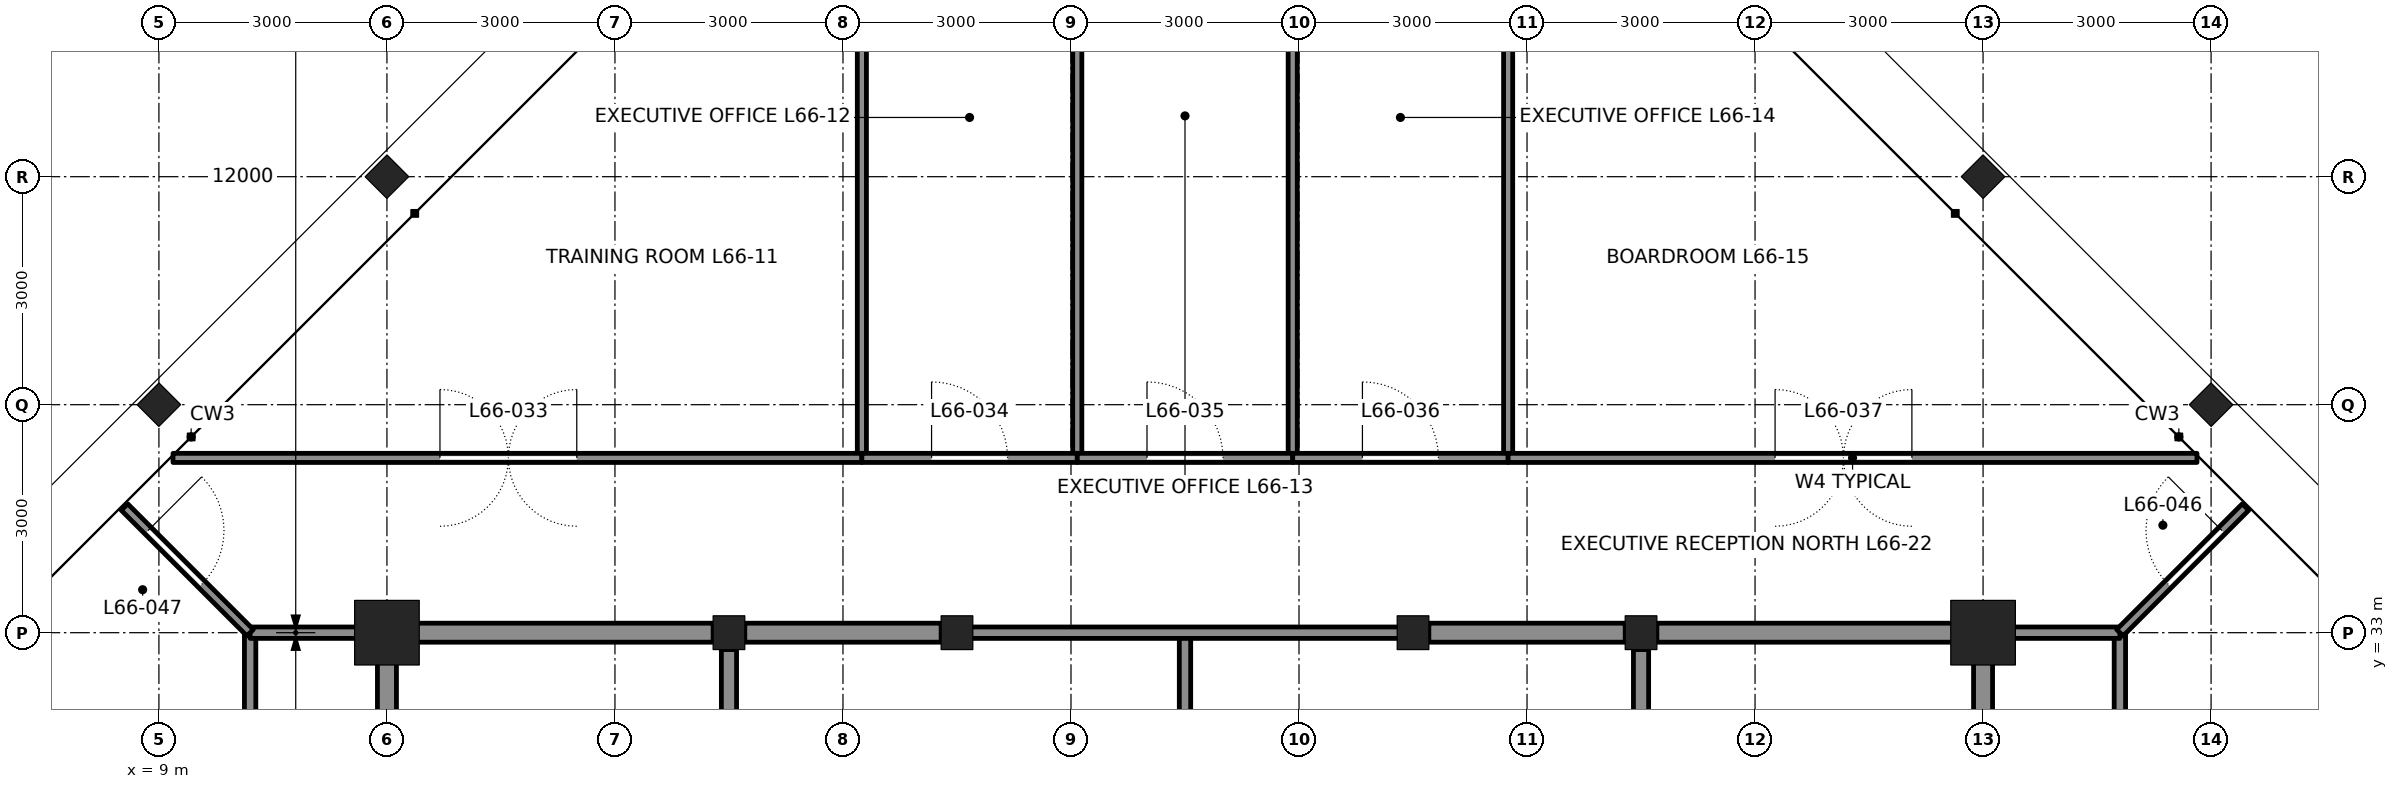
"""IFC4 building model, lengths in metres.
Left out: names, types, materials, properties, quantities, classifications, styles, units other than length and angle.
Written with IfcOpenShell. Run it as: python <this file> out.ifc"""

import sys

from ifc_helpers import new_model, si_unit, direction, frame, frame_2d, origin, origin_2d, place, context, subcontext, project, spatial, rectangle, hollow_rectangle, i_section, extrude, element, fill, save


model = new_model("IFC4")
c1 = context("Model", 3, precision=1e-05, world=origin(), true_north=direction((0.0, 1.0)))
c2 = subcontext(c1, "Body", "Model", "MODEL_VIEW")
j1 = project(units=[si_unit("LENGTHUNIT", "METRE"), si_unit("PLANEANGLEUNIT", "RADIAN")], contexts=[c1])
p1 = place(None, origin())
s1 = spatial("IfcSite", under=j1, at=p1, CompositionType="ELEMENT")
p2 = place(p1, origin())
s2 = spatial("IfcBuilding", under=s1, at=p2, CompositionType="ELEMENT")
p3 = place(p2, frame((0.0, 0.0, 295.8)))
s3 = spatial("IfcBuildingStorey", under=s2, at=p3, CompositionType="ELEMENT", Elevation=295.8)
for number, where, z_axis, x_axis in (
    (1, (36.0, 36.0, 0.0), (0.0, 0.0, 1.0), (0.707, 0.707, 0.0)),
    (2, (33.0, 39.0, 0.0), (0.0, 0.0, 1.0), (0.707, 0.707, 0.0)),
    (3, (12.0, 39.0, 0.0), (0.0, 0.0, 1.0), (-0.707, 0.707, 0.0)),
    (4, (9.0, 36.0, 0.0), (0.0, 0.0, 1.0), (-0.707, 0.707, 0.0)),
):
    element("IfcColumn", number, at=place(p3, frame(where, z_axis=z_axis, x_axis=x_axis)), inside=s3, PredefinedType="COLUMN", context=c2, shape_type="SweptSolid", body=[
        extrude(i_section(OverallWidth=0.404, OverallDepth=0.406, WebThickness=0.027, FlangeThickness=0.044, at=origin_2d()), origin(), (0.0, 0.0, 1.0), 4.2),
    ])
p4 = place(p3, frame((12.0, 33.0, 0.0), z_axis=(0.0, 0.0, 1.0), x_axis=(1.0, 0.0, 0.0)))
e5 = element("IfcColumn", 5, at=p4, inside=s3, PredefinedType="COLUMN", context=c2, shape_type="SweptSolid", body=[
    extrude(hollow_rectangle(XDim=0.85, YDim=0.85, WallThickness=0.085, at=origin_2d()), origin(), (0.0, 0.0, 1.0), 4.2),
])
for number, where, z_axis, x_axis in (
    (6, (16.5, 33.0, 0.0), (0.0, 0.0, 1.0), (1.0, 0.0, 0.0)),
    (7, (19.5, 33.0, 0.0), (0.0, 0.0, 1.0), (1.0, 0.0, 0.0)),
    (8, (25.5, 33.0, 0.0), (0.0, 0.0, 1.0), (1.0, 0.0, 0.0)),
    (9, (28.5, 33.0, 0.0), (0.0, 0.0, 1.0), (1.0, 0.0, 0.0)),
):
    element("IfcColumn", number, at=place(p3, frame(where, z_axis=z_axis, x_axis=x_axis)), inside=s3, PredefinedType="COLUMN", context=c2, shape_type="SweptSolid", body=[
        extrude(i_section(OverallWidth=0.417, OverallDepth=0.445, WebThickness=0.039, FlangeThickness=0.063, at=origin_2d()), origin(), (0.0, 0.0, 1.0), 4.2),
    ])
p5 = place(p3, frame((33.0, 33.0, 0.0), z_axis=(0.0, 0.0, 1.0), x_axis=(1.0, 0.0, 0.0)))
e10 = element("IfcColumn", 10, at=p5, inside=s3, PredefinedType="COLUMN", context=c2, shape_type="SweptSolid", body=[
    extrude(hollow_rectangle(XDim=0.85, YDim=0.85, WallThickness=0.085, at=origin_2d()), origin(), (0.0, 0.0, 1.0), 4.2),
])
p6 = place(p3, frame((12.0, 24.222, 0.0), z_axis=(0.0, 0.0, 1.0), x_axis=(0.0, 1.0, 0.0)))
e11 = element("IfcWall", 11, at=p6, inside=s3, PredefinedType="SOLIDWALL", context=c2, shape_type="SweptSolid", body=[
    extrude(rectangle(XDim=8.528, YDim=0.25, at=frame_2d((4.264, 0.0))), origin(), (0.0, 0.0, 1.0), 3.113),
])
p7 = place(p6, frame((0.678, 0.0, 0.0)))
e12 = element("IfcOpeningElement", 12, at=p7, cuts=e11, PredefinedType="OPENING", context=c2, shape_type="SweptSolid", body=[
    extrude(rectangle(XDim=1.2, YDim=2.1, at=frame_2d((0.6, 1.05))), frame((0.0, 0.135, 0.0), z_axis=(0.0, -1.0, 0.0), x_axis=(1.0, 0.0, 0.0)), (0.0, 0.0, 1.0), 0.27),
])
p8 = place(p6, frame((6.903, 0.0, 0.0)))
e13 = element("IfcOpeningElement", 13, at=p8, cuts=e11, PredefinedType="OPENING", context=c2, shape_type="SweptSolid", body=[
    extrude(rectangle(XDim=0.75, YDim=2.1, at=frame_2d((0.375, 1.05))), frame((0.0, 0.135, 0.0), z_axis=(0.0, -1.0, 0.0), x_axis=(1.0, 0.0, 0.0)), (0.0, 0.0, 1.0), 0.27),
])
p9 = place(p3, frame((12.25, 33.0, 0.0), z_axis=(0.0, 0.0, 1.0), x_axis=(1.0, 0.0, 0.0)))
e14 = element("IfcWall", 14, at=p9, inside=s3, PredefinedType="SOLIDWALL", context=c2, shape_type="SweptSolid", body=[
    extrude(rectangle(XDim=4.042, YDim=0.25, at=frame_2d((2.021, 0.0))), origin(), (0.0, 0.0, 1.0), 3.181),
])
for number, where, z_axis, x_axis in (
    (15, (16.708, 33.0, 0.0), (0.0, 0.0, 1.0), (1.0, 0.0, 0.0)),
    (16, (25.708, 33.0, 0.0), (0.0, 0.0, 1.0), (1.0, 0.0, 0.0)),
):
    element("IfcWall", number, at=place(p3, frame(where, z_axis=z_axis, x_axis=x_axis)), inside=s3, PredefinedType="SOLIDWALL", context=c2, shape_type="SweptSolid", body=[
        extrude(rectangle(XDim=2.583, YDim=0.25, at=frame_2d((1.292, 0.0))), origin(), (0.0, 0.0, 1.0), 3.181),
    ])
p10 = place(p3, frame((28.708, 33.0, 0.0), z_axis=(0.0, 0.0, 1.0), x_axis=(1.0, 0.0, 0.0)))
e17 = element("IfcWall", 17, at=p10, inside=s3, PredefinedType="SOLIDWALL", context=c2, shape_type="SweptSolid", body=[
    extrude(rectangle(XDim=4.042, YDim=0.25, at=frame_2d((2.021, 0.0))), origin(), (0.0, 0.0, 1.0), 3.181),
])
for number, where, z_axis, x_axis in (
    (18, (16.5, 24.222, 0.0), (0.0, 0.0, 1.0), (0.0, 1.0, 0.0)),
    (19, (28.5, 24.222, 0.0), (0.0, 0.0, 1.0), (0.0, 1.0, 0.0)),
):
    element("IfcWall", number, at=place(p3, frame(where, z_axis=z_axis, x_axis=x_axis)), inside=s3, PredefinedType="SOLIDWALL", context=c2, shape_type="SweptSolid", body=[
        extrude(rectangle(XDim=8.555, YDim=0.2, at=frame_2d((4.278, 0.0))), origin(), (0.0, 0.0, 1.0), 3.113),
    ])
p11 = place(p3, frame((33.0, 24.222, 0.0), z_axis=(0.0, 0.0, 1.0), x_axis=(0.0, 1.0, 0.0)))
e20 = element("IfcWall", 20, at=p11, inside=s3, PredefinedType="SOLIDWALL", context=c2, shape_type="SweptSolid", body=[
    extrude(rectangle(XDim=8.528, YDim=0.25, at=frame_2d((4.264, 0.0))), origin(), (0.0, 0.0, 1.0), 3.113),
])
p12 = place(p11, frame((6.903, 0.0, 0.0)))
e21 = element("IfcOpeningElement", 21, at=p12, cuts=e20, PredefinedType="OPENING", context=c2, shape_type="SweptSolid", body=[
    extrude(rectangle(XDim=0.75, YDim=2.1, at=frame_2d((0.375, 1.05))), frame((0.0, 0.135, 0.0), z_axis=(0.0, -1.0, 0.0), x_axis=(1.0, 0.0, 0.0)), (0.0, 0.0, 1.0), 0.27),
])
p13 = place(p3, frame((22.5, 27.0, 0.0), z_axis=(0.0, 0.0, 1.0), x_axis=(0.0, 1.0, 0.0)))
e22 = element("IfcWall", 22, at=p13, inside=s3, PredefinedType="PARTITIONING", context=c2, shape_type="SweptSolid", body=[
    extrude(rectangle(XDim=6.0, YDim=0.15, at=frame_2d((3.0, 0.0))), origin(), (0.0, 0.0, 1.0), 4.04),
])
p14 = place(p3, frame((19.5, 33.0, 0.0), z_axis=(0.0, 0.0, 1.0), x_axis=(1.0, 0.0, 0.0)))
e23 = element("IfcWall", 23, at=p14, inside=s3, PredefinedType="PARTITIONING", context=c2, shape_type="SweptSolid", body=[
    extrude(rectangle(XDim=6.0, YDim=0.15, at=frame_2d((3.0, 0.0))), origin(), (0.0, 0.0, 1.0), 3.181),
])
p15 = place(p3, frame((18.249, 44.334, 0.0), z_axis=(0.0, 0.0, 1.0), x_axis=(0.0, -1.0, 0.0)))
e24 = element("IfcWall", 24, at=p15, inside=s3, PredefinedType="PARTITIONING", context=c2, shape_type="SweptSolid", body=[
    extrude(rectangle(XDim=9.034, YDim=0.12, at=frame_2d((4.517, 0.0))), origin(), (0.0, 0.0, 1.0), 4.04),
])
for number, where, z_axis, x_axis in (
    (25, (21.083, 44.347, 0.0), (0.0, 0.0, 1.0), (0.0, -1.0, 0.0)),
    (26, (23.917, 44.347, 0.0), (0.0, 0.0, 1.0), (0.0, -1.0, 0.0)),
):
    element("IfcWall", number, at=place(p3, frame(where, z_axis=z_axis, x_axis=x_axis)), inside=s3, PredefinedType="PARTITIONING", context=c2, shape_type="SweptSolid", body=[
        extrude(rectangle(XDim=9.047, YDim=0.12, at=frame_2d((4.524, 0.0))), origin(), (0.0, 0.0, 1.0), 3.278),
    ])
p16 = place(p3, frame((26.751, 44.334, 0.0), z_axis=(0.0, 0.0, 1.0), x_axis=(0.0, -1.0, 0.0)))
e27 = element("IfcWall", 27, at=p16, inside=s3, PredefinedType="PARTITIONING", context=c2, shape_type="SweptSolid", body=[
    extrude(rectangle(XDim=9.034, YDim=0.12, at=frame_2d((4.517, 0.0))), origin(), (0.0, 0.0, 1.0), 4.04),
])
p17 = place(p3, frame((9.186, 35.3, 0.0), z_axis=(0.0, 0.0, 1.0), x_axis=(1.0, 0.0, 0.0)))
e28 = element("IfcWall", 28, at=p17, inside=s3, PredefinedType="PARTITIONING", context=c2, shape_type="SweptSolid", body=[
    extrude(rectangle(XDim=9.063, YDim=0.12, at=frame_2d((4.531, 0.0))), origin(), (0.0, 0.0, 1.0), 4.04),
])
p18 = place(p17, frame((3.512, 0.0, 0.0)))
e29 = element("IfcOpeningElement", 29, at=p18, cuts=e28, PredefinedType="OPENING", context=c2, shape_type="SweptSolid", body=[
    extrude(rectangle(XDim=1.8, YDim=2.4, at=frame_2d((0.9, 1.2))), frame((0.0, 0.07, 0.0), z_axis=(0.0, -1.0, 0.0), x_axis=(1.0, 0.0, 0.0)), (0.0, 0.0, 1.0), 0.14),
])
p19 = place(p3, frame((18.249, 35.3, 0.0), z_axis=(0.0, 0.0, 1.0), x_axis=(1.0, 0.0, 0.0)))
e30 = element("IfcWall", 30, at=p19, inside=s3, PredefinedType="PARTITIONING", context=c2, shape_type="SweptSolid", body=[
    extrude(rectangle(XDim=2.834, YDim=0.12, at=frame_2d((1.417, 0.0))), origin(), (0.0, 0.0, 1.0), 4.04),
])
p20 = place(p19, frame((0.917, 0.0, 0.0)))
e31 = element("IfcOpeningElement", 31, at=p20, cuts=e30, PredefinedType="OPENING", context=c2, shape_type="SweptSolid", body=[
    extrude(rectangle(XDim=1.0, YDim=2.4, at=frame_2d((0.5, 1.2))), frame((0.0, 0.07, 0.0), z_axis=(0.0, -1.0, 0.0), x_axis=(1.0, 0.0, 0.0)), (0.0, 0.0, 1.0), 0.14),
])
p21 = place(p3, frame((21.083, 35.3, 0.0), z_axis=(0.0, 0.0, 1.0), x_axis=(1.0, 0.0, 0.0)))
e32 = element("IfcWall", 32, at=p21, inside=s3, PredefinedType="PARTITIONING", context=c2, shape_type="SweptSolid", body=[
    extrude(rectangle(XDim=2.834, YDim=0.12, at=frame_2d((1.417, 0.0))), origin(), (0.0, 0.0, 1.0), 4.04),
])
p22 = place(p21, frame((0.917, 0.0, 0.0)))
e33 = element("IfcOpeningElement", 33, at=p22, cuts=e32, PredefinedType="OPENING", context=c2, shape_type="SweptSolid", body=[
    extrude(rectangle(XDim=1.0, YDim=2.4, at=frame_2d((0.5, 1.2))), frame((0.0, 0.07, 0.0), z_axis=(0.0, -1.0, 0.0), x_axis=(1.0, 0.0, 0.0)), (0.0, 0.0, 1.0), 0.14),
])
p23 = place(p3, frame((23.917, 35.3, 0.0), z_axis=(0.0, 0.0, 1.0), x_axis=(1.0, 0.0, 0.0)))
e34 = element("IfcWall", 34, at=p23, inside=s3, PredefinedType="PARTITIONING", context=c2, shape_type="SweptSolid", body=[
    extrude(rectangle(XDim=2.834, YDim=0.12, at=frame_2d((1.417, 0.0))), origin(), (0.0, 0.0, 1.0), 4.04),
])
p24 = place(p23, frame((0.917, 0.0, 0.0)))
e35 = element("IfcOpeningElement", 35, at=p24, cuts=e34, PredefinedType="OPENING", context=c2, shape_type="SweptSolid", body=[
    extrude(rectangle(XDim=1.0, YDim=2.4, at=frame_2d((0.5, 1.2))), frame((0.0, 0.07, 0.0), z_axis=(0.0, -1.0, 0.0), x_axis=(1.0, 0.0, 0.0)), (0.0, 0.0, 1.0), 0.14),
])
p25 = place(p3, frame((26.751, 35.3, 0.0), z_axis=(0.0, 0.0, 1.0), x_axis=(1.0, 0.0, 0.0)))
e36 = element("IfcWall", 36, at=p25, inside=s3, PredefinedType="PARTITIONING", context=c2, shape_type="SweptSolid", body=[
    extrude(rectangle(XDim=9.063, YDim=0.12, at=frame_2d((4.531, 0.0))), origin(), (0.0, 0.0, 1.0), 4.04),
])
p26 = place(p25, frame((3.512, 0.0, 0.0)))
e37 = element("IfcOpeningElement", 37, at=p26, cuts=e36, PredefinedType="OPENING", context=c2, shape_type="SweptSolid", body=[
    extrude(rectangle(XDim=1.8, YDim=2.4, at=frame_2d((0.9, 1.2))), frame((0.0, 0.07, 0.0), z_axis=(0.0, -1.0, 0.0), x_axis=(1.0, 0.0, 0.0)), (0.0, 0.0, 1.0), 0.14),
])
p27 = place(p3, frame((10.2, 8.686, 0.0), z_axis=(0.0, 0.0, 1.0), x_axis=(0.0, 1.0, 0.0)))
e38 = element("IfcWall", 38, at=p27, inside=s3, PredefinedType="PARTITIONING", context=c2, shape_type="SweptSolid", body=[
    extrude(rectangle(XDim=24.314, YDim=0.15, at=frame_2d((12.157, 0.0))), origin(), (0.0, 0.0, 1.0), 4.04),
])
p28 = place(p27, frame((11.5, 0.0, 0.0)))
e39 = element("IfcOpeningElement", 39, at=p28, cuts=e38, PredefinedType="OPENING", context=c2, shape_type="SweptSolid", body=[
    extrude(rectangle(XDim=1.0, YDim=2.4, at=frame_2d((0.5, 1.2))), frame((0.0, 0.085, 0.0), z_axis=(0.0, -1.0, 0.0), x_axis=(1.0, 0.0, 0.0)), (0.0, 0.0, 1.0), 0.17),
])
p29 = place(p3, frame((10.2, 33.0, 0.0), z_axis=(0.0, 0.0, 1.0), x_axis=(1.0, 0.0, 0.0)))
e40 = element("IfcWall", 40, at=p29, inside=s3, PredefinedType="PARTITIONING", context=c2, shape_type="SweptSolid", body=[
    extrude(rectangle(XDim=1.8, YDim=0.15, at=frame_2d((0.9, 0.0))), origin(), (0.0, 0.0, 1.0), 3.093),
])
p30 = place(p3, frame((34.8, 8.686, 0.0), z_axis=(0.0, 0.0, 1.0), x_axis=(0.0, 1.0, 0.0)))
e41 = element("IfcWall", 41, at=p30, inside=s3, PredefinedType="PARTITIONING", context=c2, shape_type="SweptSolid", body=[
    extrude(rectangle(XDim=24.314, YDim=0.15, at=frame_2d((12.157, 0.0))), origin(), (0.0, 0.0, 1.0), 4.04),
])
p31 = place(p30, frame((11.5, 0.0, 0.0)))
e42 = element("IfcOpeningElement", 42, at=p31, cuts=e41, PredefinedType="OPENING", context=c2, shape_type="SweptSolid", body=[
    extrude(rectangle(XDim=1.0, YDim=2.4, at=frame_2d((0.5, 1.2))), frame((0.0, 0.085, 0.0), z_axis=(0.0, -1.0, 0.0), x_axis=(1.0, 0.0, 0.0)), (0.0, 0.0, 1.0), 0.17),
])
p32 = place(p3, frame((33.0, 33.0, 0.0), z_axis=(0.0, 0.0, 1.0), x_axis=(1.0, 0.0, 0.0)))
e43 = element("IfcWall", 43, at=p32, inside=s3, PredefinedType="PARTITIONING", context=c2, shape_type="SweptSolid", body=[
    extrude(rectangle(XDim=1.8, YDim=0.15, at=frame_2d((0.9, 0.0))), origin(), (0.0, 0.0, 1.0), 3.093),
])
p33 = place(p3, frame((34.8, 33.0, 0.0), z_axis=(0.0, 0.0, 1.0), x_axis=(0.707106781187, 0.707106781187, 0.0)))
e44 = element("IfcWall", 44, at=p33, inside=s3, PredefinedType="PARTITIONING", context=c2, shape_type="SweptSolid", body=[
    extrude(rectangle(XDim=2.338, YDim=0.12, at=frame_2d((1.169, 0.0))), origin(), (0.0, 0.0, 1.0), 4.04),
])
p34 = place(p33, frame((0.9, 0.0, 0.0)))
e45 = element("IfcOpeningElement", 45, at=p34, cuts=e44, PredefinedType="OPENING", context=c2, shape_type="SweptSolid", body=[
    extrude(rectangle(XDim=1.0, YDim=2.4, at=frame_2d((0.5, 1.2))), frame((0.0, 0.07, 0.0), z_axis=(0.0, -1.0, 0.0), x_axis=(1.0, 0.0, 0.0)), (0.0, 0.0, 1.0), 0.14),
])
p35 = place(p3, frame((10.2, 33.0, 0.0), z_axis=(0.0, 0.0, 1.0), x_axis=(-0.707106781187, 0.707106781187, 0.0)))
e46 = element("IfcWall", 46, at=p35, inside=s3, PredefinedType="PARTITIONING", context=c2, shape_type="SweptSolid", body=[
    extrude(rectangle(XDim=2.338, YDim=0.12, at=frame_2d((1.169, 0.0))), origin(), (0.0, 0.0, 1.0), 4.04),
])
p36 = place(p35, frame((0.9, 0.0, 0.0)))
e47 = element("IfcOpeningElement", 47, at=p36, cuts=e46, PredefinedType="OPENING", context=c2, shape_type="SweptSolid", body=[
    extrude(rectangle(XDim=1.0, YDim=2.4, at=frame_2d((0.5, 1.2))), frame((0.0, 0.07, 0.0), z_axis=(0.0, -1.0, 0.0), x_axis=(1.0, 0.0, 0.0)), (0.0, 0.0, 1.0), 0.14),
])
p37 = place(p18, origin())
e48 = element("IfcDoor", 48, at=p37, inside=s3, OperationType="DOUBLE_DOOR_DOUBLE_SWING", PredefinedType="DOOR", context=c2, shape_type="SweptSolid", body=[
    extrude(rectangle(XDim=1.8, YDim=2.4, at=frame_2d((0.9, 1.2))), frame((0.0, 0.025, 0.0), z_axis=(0.0, -1.0, 0.0), x_axis=(1.0, 0.0, 0.0)), (0.0, 0.0, 1.0), 0.05),
])
fill(e29, e48)
p38 = place(p20, origin())
e49 = element("IfcDoor", 49, at=p38, inside=s3, OperationType="SINGLE_SWING_LEFT", PredefinedType="DOOR", context=c2, shape_type="SweptSolid", body=[
    extrude(rectangle(XDim=1.0, YDim=2.4, at=frame_2d((0.5, 1.2))), frame((0.0, 0.025, 0.0), z_axis=(0.0, -1.0, 0.0), x_axis=(1.0, 0.0, 0.0)), (0.0, 0.0, 1.0), 0.05),
])
fill(e31, e49)
p39 = place(p22, origin())
e50 = element("IfcDoor", 50, at=p39, inside=s3, OperationType="SINGLE_SWING_LEFT", PredefinedType="DOOR", context=c2, shape_type="SweptSolid", body=[
    extrude(rectangle(XDim=1.0, YDim=2.4, at=frame_2d((0.5, 1.2))), frame((0.0, 0.025, 0.0), z_axis=(0.0, -1.0, 0.0), x_axis=(1.0, 0.0, 0.0)), (0.0, 0.0, 1.0), 0.05),
])
fill(e33, e50)
p40 = place(p24, origin())
e51 = element("IfcDoor", 51, at=p40, inside=s3, OperationType="SINGLE_SWING_LEFT", PredefinedType="DOOR", context=c2, shape_type="SweptSolid", body=[
    extrude(rectangle(XDim=1.0, YDim=2.4, at=frame_2d((0.5, 1.2))), frame((0.0, 0.025, 0.0), z_axis=(0.0, -1.0, 0.0), x_axis=(1.0, 0.0, 0.0)), (0.0, 0.0, 1.0), 0.05),
])
fill(e35, e51)
p41 = place(p26, origin())
e52 = element("IfcDoor", 52, at=p41, inside=s3, OperationType="DOUBLE_DOOR_DOUBLE_SWING", PredefinedType="DOOR", context=c2, shape_type="SweptSolid", body=[
    extrude(rectangle(XDim=1.8, YDim=2.4, at=frame_2d((0.9, 1.2))), frame((0.0, 0.025, 0.0), z_axis=(0.0, -1.0, 0.0), x_axis=(1.0, 0.0, 0.0)), (0.0, 0.0, 1.0), 0.05),
])
fill(e37, e52)
p42 = place(p34, origin())
e53 = element("IfcDoor", 53, at=p42, inside=s3, OperationType="SINGLE_SWING_RIGHT", PredefinedType="DOOR", context=c2, shape_type="SweptSolid", body=[
    extrude(rectangle(XDim=1.0, YDim=2.4, at=frame_2d((0.5, 1.2))), frame((0.0, 0.025, 0.0), z_axis=(0.0, -1.0, 0.0), x_axis=(1.0, 0.0, 0.0)), (0.0, 0.0, 1.0), 0.05),
])
fill(e45, e53)
p43 = place(p36, frame((1.0, 0.0, 0.0), z_axis=(0.0, 0.0, 1.0), x_axis=(-1.0, 0.0, 0.0)))
e54 = element("IfcDoor", 54, at=p43, inside=s3, OperationType="SINGLE_SWING_LEFT", PredefinedType="DOOR", context=c2, shape_type="SweptSolid", body=[
    extrude(rectangle(XDim=1.0, YDim=2.4, at=frame_2d((0.5, 1.2))), frame((0.0, 0.025, 0.0), z_axis=(0.0, -1.0, 0.0), x_axis=(1.0, 0.0, 0.0)), (0.0, 0.0, 1.0), 0.05),
])
fill(e47, e54)
save(model, sys.argv[1])
